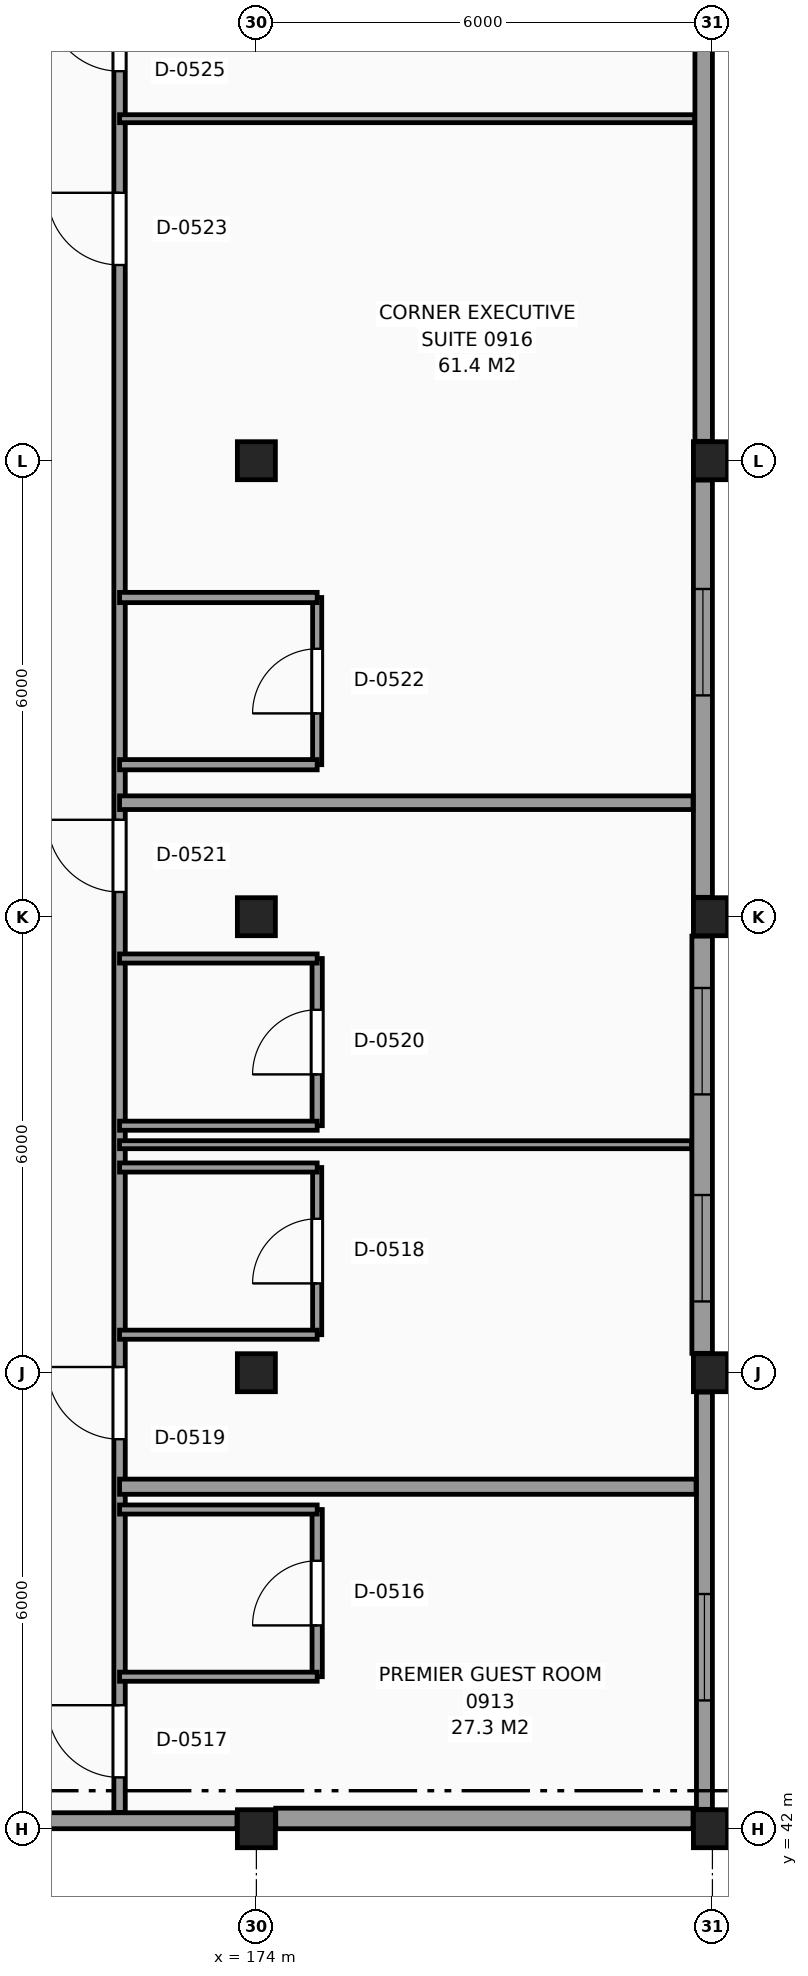
"""IFC4 building model, lengths in metres.
Left out: names, types, materials, properties, quantities, classifications, styles, units other than length and angle.
Written with IfcOpenShell. Run it as: python <this file> out.ifc"""

import sys

from ifc_helpers import new_model, si_unit, direction, frame, frame_2d, origin, origin_2d, place, context, subcontext, project, spatial, rectangle, extrude, element, fill, save


model = new_model("IFC4")
c1 = context("Model", 3, precision=1e-05, world=origin(), true_north=direction((0.0, 1.0)))
c2 = subcontext(c1, "Body", "Model", "MODEL_VIEW")
j1 = project(units=[si_unit("LENGTHUNIT", "METRE"), si_unit("PLANEANGLEUNIT", "RADIAN")], contexts=[c1])
p1 = place(None, origin())
s1 = spatial("IfcSite", under=j1, at=p1, CompositionType="ELEMENT")
p2 = place(p1, origin())
s2 = spatial("IfcBuilding", under=s1, at=p2, CompositionType="ELEMENT")
p3 = place(p2, frame((0.0, 0.0, 38.1)))
s3 = spatial("IfcBuildingStorey", under=s2, at=p3, CompositionType="ELEMENT", Elevation=38.1)
for number, where, z_axis, x_axis in (
    (1, (174.0, 42.0, 0.0), (0.0, 0.0, 1.0), (1.0, 0.0, 0.0)),
    (2, (174.0, 48.0, 0.0), (0.0, 0.0, 1.0), (1.0, 0.0, 0.0)),
    (3, (174.0, 54.0, 0.0), (0.0, 0.0, 1.0), (1.0, 0.0, 0.0)),
    (4, (174.0, 60.0, 0.0), (0.0, 0.0, 1.0), (1.0, 0.0, 0.0)),
    (5, (180.0, 42.0, 0.0), (0.0, 0.0, 1.0), (1.0, 0.0, 0.0)),
    (6, (180.0, 48.0, 0.0), (0.0, 0.0, 1.0), (1.0, 0.0, 0.0)),
    (7, (180.0, 54.0, 0.0), (0.0, 0.0, 1.0), (1.0, 0.0, 0.0)),
    (8, (180.0, 60.0, 0.0), (0.0, 0.0, 1.0), (1.0, 0.0, 0.0)),
):
    element("IfcColumn", number, at=place(p3, frame(where, z_axis=z_axis, x_axis=x_axis)), inside=s3, PredefinedType="COLUMN", context=c2, shape_type="SweptSolid", body=[
        extrude(rectangle(XDim=0.5, YDim=0.5, at=origin_2d()), origin(), (0.0, 0.0, 1.0), 3.3),
    ])
p4 = place(p3, frame((179.895, 42.255, 0.0), z_axis=(0.0, 0.0, 1.0), x_axis=(0.0, 1.0, 0.0)))
e9 = element("IfcWall", 9, at=p4, inside=s3, PredefinedType="SOLIDWALL", context=c2, shape_type="SweptSolid", body=[
    extrude(rectangle(XDim=5.49, YDim=0.21, at=frame_2d((2.745, 0.0))), origin(), (0.0, 0.0, 1.0), 2.41),
])
p5 = place(p4, frame((1.433, 0.0, 0.8)))
e10 = element("IfcOpeningElement", 10, at=p5, cuts=e9, PredefinedType="OPENING", context=c2, shape_type="SweptSolid", body=[
    extrude(rectangle(XDim=1.4, YDim=1.4, at=frame_2d((0.7, 0.7))), frame((0.0, 0.115, 0.0), z_axis=(0.0, -1.0, 0.0), x_axis=(1.0, 0.0, 0.0)), (0.0, 0.0, 1.0), 0.23),
])
p6 = place(p3, frame((179.865, 48.255, 0.0), z_axis=(0.0, 0.0, 1.0), x_axis=(0.0, 1.0, 0.0)))
e11 = element("IfcWall", 11, at=p6, inside=s3, PredefinedType="SOLIDWALL", context=c2, shape_type="SweptSolid", body=[
    extrude(rectangle(XDim=5.49, YDim=0.27, at=frame_2d((2.745, 0.0))), origin(), (0.0, 0.0, 1.0), 2.41),
])
p7 = place(p6, frame((0.683, 0.0, 0.8)))
e12 = element("IfcOpeningElement", 12, at=p7, cuts=e11, PredefinedType="OPENING", context=c2, shape_type="SweptSolid", body=[
    extrude(rectangle(XDim=1.4, YDim=1.4, at=frame_2d((0.7, 0.7))), frame((0.0, 0.145, 0.0), z_axis=(0.0, -1.0, 0.0), x_axis=(1.0, 0.0, 0.0)), (0.0, 0.0, 1.0), 0.29),
])
p8 = place(p6, frame((3.407, 0.0, 0.8)))
e13 = element("IfcOpeningElement", 13, at=p8, cuts=e11, PredefinedType="OPENING", context=c2, shape_type="SweptSolid", body=[
    extrude(rectangle(XDim=1.4, YDim=1.4, at=frame_2d((0.7, 0.7))), frame((0.0, 0.145, 0.0), z_axis=(0.0, -1.0, 0.0), x_axis=(1.0, 0.0, 0.0)), (0.0, 0.0, 1.0), 0.29),
])
p9 = place(p3, frame((179.875, 54.255, 0.0), z_axis=(0.0, 0.0, 1.0), x_axis=(0.0, 1.0, 0.0)))
e14 = element("IfcWall", 14, at=p9, inside=s3, PredefinedType="SOLIDWALL", context=c2, shape_type="SweptSolid", body=[
    extrude(rectangle(XDim=5.49, YDim=0.25, at=frame_2d((2.745, 0.0))), origin(), (0.0, 0.0, 1.0), 2.41),
])
p10 = place(p9, frame((2.657, 0.0, 0.8)))
e15 = element("IfcOpeningElement", 15, at=p10, cuts=e14, PredefinedType="OPENING", context=c2, shape_type="SweptSolid", body=[
    extrude(rectangle(XDim=1.4, YDim=1.4, at=frame_2d((0.7, 0.7))), frame((0.0, 0.135, 0.0), z_axis=(0.0, -1.0, 0.0), x_axis=(1.0, 0.0, 0.0)), (0.0, 0.0, 1.0), 0.27),
])
p11 = place(p3, frame((179.885, 60.255, 0.0), z_axis=(0.0, 0.0, 1.0), x_axis=(0.0, 1.0, 0.0)))
e16 = element("IfcWall", 16, at=p11, inside=s3, PredefinedType="SOLIDWALL", context=c2, shape_type="SweptSolid", body=[
    extrude(rectangle(XDim=5.49, YDim=0.23, at=frame_2d((2.745, 0.0))), origin(), (0.0, 0.0, 1.0), 2.41),
])
p12 = place(p3, frame((168.255, 42.105, 0.0), z_axis=(0.0, 0.0, 1.0), x_axis=(1.0, 0.0, 0.0)))
e17 = element("IfcWall", 17, at=p12, inside=s3, PredefinedType="SOLIDWALL", context=c2, shape_type="SweptSolid", body=[
    extrude(rectangle(XDim=5.49, YDim=0.21, at=frame_2d((2.745, 0.0))), origin(), (0.0, 0.0, 1.0), 2.26),
])
p13 = place(p3, frame((174.255, 42.135, 0.0), z_axis=(0.0, 0.0, 1.0), x_axis=(1.0, 0.0, 0.0)))
e18 = element("IfcWall", 18, at=p13, inside=s3, PredefinedType="SOLIDWALL", context=c2, shape_type="SweptSolid", body=[
    extrude(rectangle(XDim=5.49, YDim=0.27, at=frame_2d((2.745, 0.0))), origin(), (0.0, 0.0, 1.0), 2.26),
])
p14 = place(p3, frame((172.2, 42.215, 0.0), z_axis=(0.0, 0.0, 1.0), x_axis=(0.0, 1.0, 0.0)))
e19 = element("IfcWall", 19, at=p14, inside=s3, PredefinedType="PARTITIONING", context=c2, shape_type="SweptSolid", body=[
    extrude(rectangle(XDim=65.605, YDim=0.15, at=frame_2d((32.802, 0.0))), origin(), (0.0, 0.0, 1.0), 3.06),
])
p15 = place(p14, frame((0.46, 0.0, 0.0)))
e20 = element("IfcOpeningElement", 20, at=p15, cuts=e19, PredefinedType="OPENING", context=c2, shape_type="SweptSolid", body=[
    extrude(rectangle(XDim=0.95, YDim=2.1, at=frame_2d((0.475, 1.05))), frame((0.0, 0.085, 0.0), z_axis=(0.0, -1.0, 0.0), x_axis=(1.0, 0.0, 0.0)), (0.0, 0.0, 1.0), 0.17),
])
p16 = place(p14, frame((4.91, 0.0, 0.0)))
e21 = element("IfcOpeningElement", 21, at=p16, cuts=e19, PredefinedType="OPENING", context=c2, shape_type="SweptSolid", body=[
    extrude(rectangle(XDim=0.95, YDim=2.1, at=frame_2d((0.475, 1.05))), frame((0.0, 0.085, 0.0), z_axis=(0.0, -1.0, 0.0), x_axis=(1.0, 0.0, 0.0)), (0.0, 0.0, 1.0), 0.17),
])
p17 = place(p14, frame((12.11, 0.0, 0.0)))
e22 = element("IfcOpeningElement", 22, at=p17, cuts=e19, PredefinedType="OPENING", context=c2, shape_type="SweptSolid", body=[
    extrude(rectangle(XDim=0.95, YDim=2.1, at=frame_2d((0.475, 1.05))), frame((0.0, 0.085, 0.0), z_axis=(0.0, -1.0, 0.0), x_axis=(1.0, 0.0, 0.0)), (0.0, 0.0, 1.0), 0.17),
])
p18 = place(p14, frame((20.36, 0.0, 0.0)))
e23 = element("IfcOpeningElement", 23, at=p18, cuts=e19, PredefinedType="OPENING", context=c2, shape_type="SweptSolid", body=[
    extrude(rectangle(XDim=0.95, YDim=2.1, at=frame_2d((0.475, 1.05))), frame((0.0, 0.085, 0.0), z_axis=(0.0, -1.0, 0.0), x_axis=(1.0, 0.0, 0.0)), (0.0, 0.0, 1.0), 0.17),
])
p19 = place(p14, frame((22.91, 0.0, 0.0)))
e24 = element("IfcOpeningElement", 24, at=p19, cuts=e19, PredefinedType="OPENING", context=c2, shape_type="SweptSolid", body=[
    extrude(rectangle(XDim=0.95, YDim=2.1, at=frame_2d((0.475, 1.05))), frame((0.0, 0.085, 0.0), z_axis=(0.0, -1.0, 0.0), x_axis=(1.0, 0.0, 0.0)), (0.0, 0.0, 1.0), 0.17),
])
p20 = place(p14, frame((30.11, 0.0, 0.0)))
e25 = element("IfcOpeningElement", 25, at=p20, cuts=e19, PredefinedType="OPENING", context=c2, shape_type="SweptSolid", body=[
    extrude(rectangle(XDim=0.95, YDim=2.1, at=frame_2d((0.475, 1.05))), frame((0.0, 0.085, 0.0), z_axis=(0.0, -1.0, 0.0), x_axis=(1.0, 0.0, 0.0)), (0.0, 0.0, 1.0), 0.17),
])
p21 = place(p14, frame((34.31, 0.0, 0.0)))
e26 = element("IfcOpeningElement", 26, at=p21, cuts=e19, PredefinedType="OPENING", context=c2, shape_type="SweptSolid", body=[
    extrude(rectangle(XDim=0.95, YDim=2.1, at=frame_2d((0.475, 1.05))), frame((0.0, 0.085, 0.0), z_axis=(0.0, -1.0, 0.0), x_axis=(1.0, 0.0, 0.0)), (0.0, 0.0, 1.0), 0.17),
])
p22 = place(p14, frame((43.61, 0.0, 0.0)))
e27 = element("IfcOpeningElement", 27, at=p22, cuts=e19, PredefinedType="OPENING", context=c2, shape_type="SweptSolid", body=[
    extrude(rectangle(XDim=0.95, YDim=2.1, at=frame_2d((0.475, 1.05))), frame((0.0, 0.085, 0.0), z_axis=(0.0, -1.0, 0.0), x_axis=(1.0, 0.0, 0.0)), (0.0, 0.0, 1.0), 0.17),
])
p23 = place(p14, frame((48.11, 0.0, 0.0)))
e28 = element("IfcOpeningElement", 28, at=p23, cuts=e19, PredefinedType="OPENING", context=c2, shape_type="SweptSolid", body=[
    extrude(rectangle(XDim=0.95, YDim=2.1, at=frame_2d((0.475, 1.05))), frame((0.0, 0.085, 0.0), z_axis=(0.0, -1.0, 0.0), x_axis=(1.0, 0.0, 0.0)), (0.0, 0.0, 1.0), 0.17),
])
p24 = place(p14, frame((52.31, 0.0, 0.0)))
e29 = element("IfcOpeningElement", 29, at=p24, cuts=e19, PredefinedType="OPENING", context=c2, shape_type="SweptSolid", body=[
    extrude(rectangle(XDim=0.95, YDim=2.1, at=frame_2d((0.475, 1.05))), frame((0.0, 0.085, 0.0), z_axis=(0.0, -1.0, 0.0), x_axis=(1.0, 0.0, 0.0)), (0.0, 0.0, 1.0), 0.17),
])
p25 = place(p14, frame((54.51, 0.0, 0.0)))
e30 = element("IfcOpeningElement", 30, at=p25, cuts=e19, PredefinedType="OPENING", context=c2, shape_type="SweptSolid", body=[
    extrude(rectangle(XDim=0.95, YDim=2.1, at=frame_2d((0.475, 1.05))), frame((0.0, 0.085, 0.0), z_axis=(0.0, -1.0, 0.0), x_axis=(1.0, 0.0, 0.0)), (0.0, 0.0, 1.0), 0.17),
])
p26 = place(p14, frame((60.51, 0.0, 0.0)))
e31 = element("IfcOpeningElement", 31, at=p26, cuts=e19, PredefinedType="OPENING", context=c2, shape_type="SweptSolid", body=[
    extrude(rectangle(XDim=0.95, YDim=2.1, at=frame_2d((0.475, 1.05))), frame((0.0, 0.085, 0.0), z_axis=(0.0, -1.0, 0.0), x_axis=(1.0, 0.0, 0.0)), (0.0, 0.0, 1.0), 0.17),
])
p27 = place(p3, frame((174.8, 44.0, 0.0), z_axis=(0.0, 0.0, 1.0), x_axis=(0.0, 1.0, 0.0)))
e32 = element("IfcWall", 32, at=p27, inside=s3, PredefinedType="PARTITIONING", context=c2, shape_type="SweptSolid", body=[
    extrude(rectangle(XDim=2.2, YDim=0.135, at=frame_2d((1.1, 0.0))), origin(), (0.0, 0.0, 1.0), 3.06),
])
p28 = place(p27, frame((0.675, 0.0, 0.0)))
e33 = element("IfcOpeningElement", 33, at=p28, cuts=e32, PredefinedType="OPENING", context=c2, shape_type="SweptSolid", body=[
    extrude(rectangle(XDim=0.85, YDim=2.1, at=frame_2d((0.425, 1.05))), frame((0.0, 0.078, 0.0), z_axis=(0.0, -1.0, 0.0), x_axis=(1.0, 0.0, 0.0)), (0.0, 0.0, 1.0), 0.155),
])
p29 = place(p3, frame((174.8, 48.5, 0.0), z_axis=(0.0, 0.0, 1.0), x_axis=(0.0, 1.0, 0.0)))
e34 = element("IfcWall", 34, at=p29, inside=s3, PredefinedType="PARTITIONING", context=c2, shape_type="SweptSolid", body=[
    extrude(rectangle(XDim=2.2, YDim=0.12, at=frame_2d((1.1, 0.0))), origin(), (0.0, 0.0, 1.0), 3.06),
])
p30 = place(p29, frame((0.675, 0.0, 0.0)))
e35 = element("IfcOpeningElement", 35, at=p30, cuts=e34, PredefinedType="OPENING", context=c2, shape_type="SweptSolid", body=[
    extrude(rectangle(XDim=0.85, YDim=2.1, at=frame_2d((0.425, 1.05))), frame((0.0, 0.07, 0.0), z_axis=(0.0, -1.0, 0.0), x_axis=(1.0, 0.0, 0.0)), (0.0, 0.0, 1.0), 0.14),
])
p31 = place(p3, frame((174.8, 51.25, 0.0), z_axis=(0.0, 0.0, 1.0), x_axis=(0.0, 1.0, 0.0)))
e36 = element("IfcWall", 36, at=p31, inside=s3, PredefinedType="PARTITIONING", context=c2, shape_type="SweptSolid", body=[
    extrude(rectangle(XDim=2.2, YDim=0.135, at=frame_2d((1.1, 0.0))), origin(), (0.0, 0.0, 1.0), 3.06),
])
p32 = place(p31, frame((0.675, 0.0, 0.0)))
e37 = element("IfcOpeningElement", 37, at=p32, cuts=e36, PredefinedType="OPENING", context=c2, shape_type="SweptSolid", body=[
    extrude(rectangle(XDim=0.85, YDim=2.1, at=frame_2d((0.425, 1.05))), frame((0.0, 0.078, 0.0), z_axis=(0.0, -1.0, 0.0), x_axis=(1.0, 0.0, 0.0)), (0.0, 0.0, 1.0), 0.155),
])
p33 = place(p3, frame((174.8, 56.0, 0.0), z_axis=(0.0, 0.0, 1.0), x_axis=(0.0, 1.0, 0.0)))
e38 = element("IfcWall", 38, at=p33, inside=s3, PredefinedType="PARTITIONING", context=c2, shape_type="SweptSolid", body=[
    extrude(rectangle(XDim=2.2, YDim=0.12, at=frame_2d((1.1, 0.0))), origin(), (0.0, 0.0, 1.0), 3.06),
])
p34 = place(p33, frame((0.675, 0.0, 0.0)))
e39 = element("IfcOpeningElement", 39, at=p34, cuts=e38, PredefinedType="OPENING", context=c2, shape_type="SweptSolid", body=[
    extrude(rectangle(XDim=0.85, YDim=2.1, at=frame_2d((0.425, 1.05))), frame((0.0, 0.07, 0.0), z_axis=(0.0, -1.0, 0.0), x_axis=(1.0, 0.0, 0.0)), (0.0, 0.0, 1.0), 0.14),
])
for number, where, z_axis, x_axis in (
    (40, (172.2, 44.0, 0.0), (0.0, 0.0, 1.0), (1.0, 0.0, 0.0)),
    (41, (172.2, 46.2, 0.0), (0.0, 0.0, 1.0), (1.0, 0.0, 0.0)),
):
    element("IfcWall", number, at=place(p3, frame(where, z_axis=z_axis, x_axis=x_axis)), inside=s3, PredefinedType="PARTITIONING", context=c2, shape_type="SweptSolid", body=[
        extrude(rectangle(XDim=2.6, YDim=0.12, at=frame_2d((1.3, 0.0))), origin(), (0.0, 0.0, 1.0), 3.06),
    ])
p35 = place(p3, frame((172.2, 46.5, 0.0), z_axis=(0.0, 0.0, 1.0), x_axis=(1.0, 0.0, 0.0)))
e42 = element("IfcWall", 42, at=p35, inside=s3, PredefinedType="PARTITIONING", context=c2, shape_type="SweptSolid", body=[
    extrude(rectangle(XDim=7.585, YDim=0.2, at=frame_2d((3.792, 0.0))), origin(), (0.0, 0.0, 1.0), 3.06),
])
for number, where, z_axis, x_axis in (
    (43, (172.2, 48.5, 0.0), (0.0, 0.0, 1.0), (1.0, 0.0, 0.0)),
    (44, (172.2, 50.7, 0.0), (0.0, 0.0, 1.0), (1.0, 0.0, 0.0)),
):
    element("IfcWall", number, at=place(p3, frame(where, z_axis=z_axis, x_axis=x_axis)), inside=s3, PredefinedType="PARTITIONING", context=c2, shape_type="SweptSolid", body=[
        extrude(rectangle(XDim=2.6, YDim=0.12, at=frame_2d((1.3, 0.0))), origin(), (0.0, 0.0, 1.0), 3.06),
    ])
p36 = place(p3, frame((172.2, 51.0, 0.0), z_axis=(0.0, 0.0, 1.0), x_axis=(1.0, 0.0, 0.0)))
e45 = element("IfcWall", 45, at=p36, inside=s3, PredefinedType="PARTITIONING", context=c2, shape_type="SweptSolid", body=[
    extrude(rectangle(XDim=7.525, YDim=0.105, at=frame_2d((3.763, 0.0))), origin(), (0.0, 0.0, 1.0), 3.06),
])
for number, where, z_axis, x_axis in (
    (46, (172.2, 51.25, 0.0), (0.0, 0.0, 1.0), (1.0, 0.0, 0.0)),
    (47, (172.2, 53.45, 0.0), (0.0, 0.0, 1.0), (1.0, 0.0, 0.0)),
):
    element("IfcWall", number, at=place(p3, frame(where, z_axis=z_axis, x_axis=x_axis)), inside=s3, PredefinedType="PARTITIONING", context=c2, shape_type="SweptSolid", body=[
        extrude(rectangle(XDim=2.6, YDim=0.12, at=frame_2d((1.3, 0.0))), origin(), (0.0, 0.0, 1.0), 3.06),
    ])
p37 = place(p3, frame((172.2, 55.5, 0.0), z_axis=(0.0, 0.0, 1.0), x_axis=(1.0, 0.0, 0.0)))
e48 = element("IfcWall", 48, at=p37, inside=s3, PredefinedType="PARTITIONING", context=c2, shape_type="SweptSolid", body=[
    extrude(rectangle(XDim=7.545, YDim=0.18, at=frame_2d((3.772, 0.0))), origin(), (0.0, 0.0, 1.0), 3.06),
])
for number, where, z_axis, x_axis in (
    (49, (172.2, 56.0, 0.0), (0.0, 0.0, 1.0), (1.0, 0.0, 0.0)),
    (50, (172.2, 58.2, 0.0), (0.0, 0.0, 1.0), (1.0, 0.0, 0.0)),
):
    element("IfcWall", number, at=place(p3, frame(where, z_axis=z_axis, x_axis=x_axis)), inside=s3, PredefinedType="PARTITIONING", context=c2, shape_type="SweptSolid", body=[
        extrude(rectangle(XDim=2.6, YDim=0.135, at=frame_2d((1.3, 0.0))), origin(), (0.0, 0.0, 1.0), 3.06),
    ])
p38 = place(p3, frame((172.2, 64.5, 0.0), z_axis=(0.0, 0.0, 1.0), x_axis=(1.0, 0.0, 0.0)))
e51 = element("IfcWall", 51, at=p38, inside=s3, PredefinedType="PARTITIONING", context=c2, shape_type="SweptSolid", body=[
    extrude(rectangle(XDim=7.565, YDim=0.105, at=frame_2d((3.782, 0.0))), origin(), (0.0, 0.0, 1.0), 3.06),
])
p39 = place(p5, origin())
e52 = element("IfcWindow", 52, at=p39, inside=s3, PartitioningType="SINGLE_PANEL", PredefinedType="WINDOW", context=c2, shape_type="SweptSolid", body=[
    extrude(rectangle(XDim=1.4, YDim=1.4, at=frame_2d((0.7, 0.7))), frame((0.0, 0.03, 0.0), z_axis=(0.0, -1.0, 0.0), x_axis=(1.0, 0.0, 0.0)), (0.0, 0.0, 1.0), 0.06),
])
fill(e10, e52)
p40 = place(p7, origin())
e53 = element("IfcWindow", 53, at=p40, inside=s3, PartitioningType="SINGLE_PANEL", PredefinedType="WINDOW", context=c2, shape_type="SweptSolid", body=[
    extrude(rectangle(XDim=1.4, YDim=1.4, at=frame_2d((0.7, 0.7))), frame((0.0, 0.03, 0.0), z_axis=(0.0, -1.0, 0.0), x_axis=(1.0, 0.0, 0.0)), (0.0, 0.0, 1.0), 0.06),
])
fill(e12, e53)
p41 = place(p8, origin())
e54 = element("IfcWindow", 54, at=p41, inside=s3, PartitioningType="SINGLE_PANEL", PredefinedType="WINDOW", context=c2, shape_type="SweptSolid", body=[
    extrude(rectangle(XDim=1.4, YDim=1.4, at=frame_2d((0.7, 0.7))), frame((0.0, 0.03, 0.0), z_axis=(0.0, -1.0, 0.0), x_axis=(1.0, 0.0, 0.0)), (0.0, 0.0, 1.0), 0.06),
])
fill(e13, e54)
p42 = place(p10, origin())
e55 = element("IfcWindow", 55, at=p42, inside=s3, PartitioningType="SINGLE_PANEL", PredefinedType="WINDOW", context=c2, shape_type="SweptSolid", body=[
    extrude(rectangle(XDim=1.4, YDim=1.4, at=frame_2d((0.7, 0.7))), frame((0.0, 0.03, 0.0), z_axis=(0.0, -1.0, 0.0), x_axis=(1.0, 0.0, 0.0)), (0.0, 0.0, 1.0), 0.06),
])
fill(e15, e55)
p43 = place(p28, origin())
e56 = element("IfcDoor", 56, at=p43, inside=s3, OperationType="SINGLE_SWING_LEFT", PredefinedType="DOOR", context=c2, shape_type="SweptSolid", body=[
    extrude(rectangle(XDim=0.85, YDim=2.1, at=frame_2d((0.425, 1.05))), frame((0.0, 0.025, 0.0), z_axis=(0.0, -1.0, 0.0), x_axis=(1.0, 0.0, 0.0)), (0.0, 0.0, 1.0), 0.05),
])
fill(e33, e56)
p44 = place(p15, origin())
e57 = element("IfcDoor", 57, at=p44, inside=s3, OperationType="SINGLE_SWING_RIGHT", PredefinedType="DOOR", context=c2, shape_type="SweptSolid", body=[
    extrude(rectangle(XDim=0.95, YDim=2.1, at=frame_2d((0.475, 1.05))), frame((0.0, 0.025, 0.0), z_axis=(0.0, -1.0, 0.0), x_axis=(1.0, 0.0, 0.0)), (0.0, 0.0, 1.0), 0.05),
])
fill(e20, e57)
p45 = place(p30, origin())
e58 = element("IfcDoor", 58, at=p45, inside=s3, OperationType="SINGLE_SWING_LEFT", PredefinedType="DOOR", context=c2, shape_type="SweptSolid", body=[
    extrude(rectangle(XDim=0.85, YDim=2.1, at=frame_2d((0.425, 1.05))), frame((0.0, 0.025, 0.0), z_axis=(0.0, -1.0, 0.0), x_axis=(1.0, 0.0, 0.0)), (0.0, 0.0, 1.0), 0.05),
])
fill(e35, e58)
p46 = place(p16, origin())
e59 = element("IfcDoor", 59, at=p46, inside=s3, OperationType="SINGLE_SWING_RIGHT", PredefinedType="DOOR", context=c2, shape_type="SweptSolid", body=[
    extrude(rectangle(XDim=0.95, YDim=2.1, at=frame_2d((0.475, 1.05))), frame((0.0, 0.025, 0.0), z_axis=(0.0, -1.0, 0.0), x_axis=(1.0, 0.0, 0.0)), (0.0, 0.0, 1.0), 0.05),
])
fill(e21, e59)
p47 = place(p32, origin())
e60 = element("IfcDoor", 60, at=p47, inside=s3, OperationType="SINGLE_SWING_LEFT", PredefinedType="DOOR", context=c2, shape_type="SweptSolid", body=[
    extrude(rectangle(XDim=0.85, YDim=2.1, at=frame_2d((0.425, 1.05))), frame((0.0, 0.025, 0.0), z_axis=(0.0, -1.0, 0.0), x_axis=(1.0, 0.0, 0.0)), (0.0, 0.0, 1.0), 0.05),
])
fill(e37, e60)
p48 = place(p17, origin())
e61 = element("IfcDoor", 61, at=p48, inside=s3, OperationType="SINGLE_SWING_RIGHT", PredefinedType="DOOR", context=c2, shape_type="SweptSolid", body=[
    extrude(rectangle(XDim=0.95, YDim=2.1, at=frame_2d((0.475, 1.05))), frame((0.0, 0.025, 0.0), z_axis=(0.0, -1.0, 0.0), x_axis=(1.0, 0.0, 0.0)), (0.0, 0.0, 1.0), 0.05),
])
fill(e22, e61)
p49 = place(p34, origin())
e62 = element("IfcDoor", 62, at=p49, inside=s3, OperationType="SINGLE_SWING_LEFT", PredefinedType="DOOR", context=c2, shape_type="SweptSolid", body=[
    extrude(rectangle(XDim=0.85, YDim=2.1, at=frame_2d((0.425, 1.05))), frame((0.0, 0.025, 0.0), z_axis=(0.0, -1.0, 0.0), x_axis=(1.0, 0.0, 0.0)), (0.0, 0.0, 1.0), 0.05),
])
fill(e39, e62)
p50 = place(p18, origin())
e63 = element("IfcDoor", 63, at=p50, inside=s3, OperationType="SINGLE_SWING_RIGHT", PredefinedType="DOOR", context=c2, shape_type="SweptSolid", body=[
    extrude(rectangle(XDim=0.95, YDim=2.1, at=frame_2d((0.475, 1.05))), frame((0.0, 0.025, 0.0), z_axis=(0.0, -1.0, 0.0), x_axis=(1.0, 0.0, 0.0)), (0.0, 0.0, 1.0), 0.05),
])
fill(e23, e63)
p51 = place(p19, origin())
e64 = element("IfcDoor", 64, at=p51, inside=s3, OperationType="SINGLE_SWING_RIGHT", PredefinedType="DOOR", context=c2, shape_type="SweptSolid", body=[
    extrude(rectangle(XDim=0.95, YDim=2.1, at=frame_2d((0.475, 1.05))), frame((0.0, 0.025, 0.0), z_axis=(0.0, -1.0, 0.0), x_axis=(1.0, 0.0, 0.0)), (0.0, 0.0, 1.0), 0.05),
])
fill(e24, e64)
save(model, sys.argv[1])
